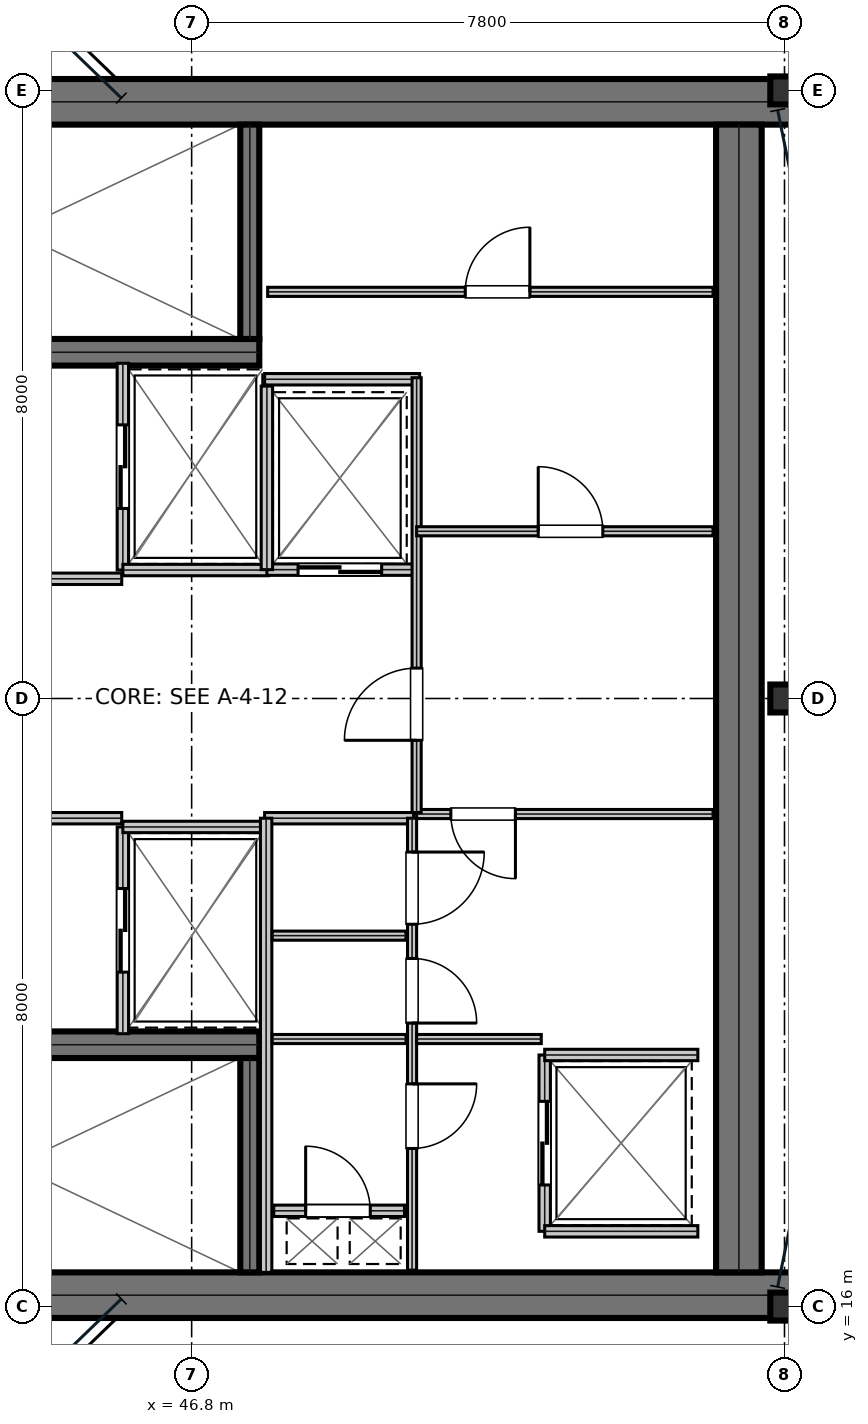
"""IFC4 building model, lengths in metres.
Left out: names, types, materials, properties, quantities, classifications, styles, units other than length and angle.
Written with IfcOpenShell. Run it as: python <this file> out.ifc"""

import sys

from ifc_helpers import new_model, si_unit, direction, frame, frame_2d, origin, origin_2d, place, context, subcontext, project, spatial, rectangle, i_section, extrude, element, fill, save


model = new_model("IFC4")
c1 = context("Model", 3, precision=1e-05, world=origin(), true_north=direction((0.0, 1.0)))
c2 = subcontext(c1, "Body", "Model", "MODEL_VIEW")
j1 = project(units=[si_unit("LENGTHUNIT", "METRE"), si_unit("PLANEANGLEUNIT", "RADIAN")], contexts=[c1])
p1 = place(None, origin())
s1 = spatial("IfcSite", under=j1, at=p1, CompositionType="ELEMENT")
p2 = place(p1, origin())
s2 = spatial("IfcBuilding", under=s1, at=p2, CompositionType="ELEMENT")
p3 = place(p2, frame((0.0, 0.0, 315.45)))
s3 = spatial("IfcBuildingStorey", under=s2, at=p3, CompositionType="ELEMENT", Elevation=315.45)
for number, where, z_axis, x_axis in (
    (1, (38.8, 31.85, 0.0), (0.0, 0.0, 1.0), (1.0, 0.0, 0.0)),
    (2, (38.8, 16.15, 0.0), (0.0, 0.0, 1.0), (1.0, 0.0, 0.0)),
):
    element("IfcWall", number, at=place(p3, frame(where, z_axis=z_axis, x_axis=x_axis)), inside=s3, PredefinedType="SHEAR", context=c2, shape_type="SweptSolid", body=[
        extrude(rectangle(XDim=16.0, YDim=0.6, at=frame_2d((8.0, 0.0))), origin(), (0.0, 0.0, 1.0), 3.78),
    ])
p4 = place(p3, frame((54.0, 16.45, 0.0), z_axis=(0.0, 0.0, 1.0), x_axis=(0.0, 1.0, 0.0)))
e3 = element("IfcWall", 3, at=p4, inside=s3, PredefinedType="SHEAR", context=c2, shape_type="SweptSolid", body=[
    extrude(rectangle(XDim=15.1, YDim=0.6, at=frame_2d((7.55, 0.0))), origin(), (0.0, 0.0, 1.0), 3.78),
])
p5 = place(p3, frame((39.98, 28.555, 0.0), z_axis=(0.0, 0.0, 1.0), x_axis=(1.0, 0.0, 0.0)))
e4 = element("IfcWall", 4, at=p5, inside=s3, PredefinedType="SHEAR", context=c2, shape_type="SweptSolid", body=[
    extrude(rectangle(XDim=7.71, YDim=0.35, at=frame_2d((3.855, 0.0))), origin(), (0.0, 0.0, 1.0), 3.78),
])
p6 = place(p5, frame((0.25, 0.0, 0.0)))
e5 = element("IfcOpeningElement", 5, at=p6, cuts=e4, PredefinedType="OPENING", context=c2, shape_type="SweptSolid", body=[
    extrude(rectangle(XDim=1.1, YDim=2.15, at=frame_2d((0.55, 1.075))), frame((0.0, 0.185, 0.0), z_axis=(0.0, -1.0, 0.0), x_axis=(1.0, 0.0, 0.0)), (0.0, 0.0, 1.0), 0.37),
])
p7 = place(p3, frame((39.98, 19.445, 0.0), z_axis=(0.0, 0.0, 1.0), x_axis=(1.0, 0.0, 0.0)))
e6 = element("IfcWall", 6, at=p7, inside=s3, PredefinedType="SHEAR", context=c2, shape_type="SweptSolid", body=[
    extrude(rectangle(XDim=7.71, YDim=0.35, at=frame_2d((3.855, 0.0))), origin(), (0.0, 0.0, 1.0), 3.78),
])
p8 = place(p7, frame((0.25, 0.0, 0.0)))
e7 = element("IfcOpeningElement", 7, at=p8, cuts=e6, PredefinedType="OPENING", context=c2, shape_type="SweptSolid", body=[
    extrude(rectangle(XDim=1.1, YDim=2.15, at=frame_2d((0.55, 1.075))), frame((0.0, 0.185, 0.0), z_axis=(0.0, -1.0, 0.0), x_axis=(1.0, 0.0, 0.0)), (0.0, 0.0, 1.0), 0.37),
])
for number, where, z_axis, x_axis in (
    (8, (47.565, 28.73, 0.0), (0.0, 0.0, 1.0), (0.0, 1.0, 0.0)),
    (9, (47.565, 16.45, 0.0), (0.0, 0.0, 1.0), (0.0, 1.0, 0.0)),
):
    element("IfcWall", number, at=place(p3, frame(where, z_axis=z_axis, x_axis=x_axis)), inside=s3, PredefinedType="SHEAR", context=c2, shape_type="SweptSolid", body=[
        extrude(rectangle(XDim=2.82, YDim=0.25, at=frame_2d((1.41, 0.0))), origin(), (0.0, 0.0, 1.0), 3.78),
    ])
for number, where, z_axis, x_axis in (
    (10, (54.6, 16.0, 0.0), (0.0, 0.0, 1.0), (1.0, 0.0, 0.0)),
    (11, (54.6, 24.0, 0.0), (0.0, 0.0, 1.0), (1.0, 0.0, 0.0)),
    (12, (54.6, 32.0, 0.0), (0.0, 0.0, 1.0), (1.0, 0.0, 0.0)),
):
    element("IfcColumn", number, at=place(p3, frame(where, z_axis=z_axis, x_axis=x_axis)), inside=s3, PredefinedType="COLUMN", context=c2, shape_type="SweptSolid", body=[
        extrude(i_section(OverallWidth=0.373, OverallDepth=0.368, WebThickness=0.015, FlangeThickness=0.024, at=origin_2d()), origin(), (0.0, 0.0, 1.0), 4.044),
    ])
p9 = place(p3, frame((39.98, 25.575, 0.0), z_axis=(0.0, 0.0, 1.0), x_axis=(1.0, 0.0, 0.0)))
e13 = element("IfcWall", 13, at=p9, inside=s3, PredefinedType="PARTITIONING", context=c2, shape_type="SweptSolid", body=[
    extrude(rectangle(XDim=5.9, YDim=0.15, at=frame_2d((2.95, 0.0))), origin(), (0.0, 0.0, 1.0), 3.78),
])
p10 = place(p9, frame((2.35, 0.0, 0.0)))
e14 = element("IfcOpeningElement", 14, at=p10, cuts=e13, PredefinedType="OPENING", context=c2, shape_type="SweptSolid", body=[
    extrude(rectangle(XDim=1.05, YDim=2.15, at=frame_2d((0.525, 1.075))), frame((0.0, 0.085, 0.0), z_axis=(0.0, -1.0, 0.0), x_axis=(1.0, 0.0, 0.0)), (0.0, 0.0, 1.0), 0.17),
])
p11 = place(p3, frame((39.98, 22.425, 0.0), z_axis=(0.0, 0.0, 1.0), x_axis=(1.0, 0.0, 0.0)))
e15 = element("IfcWall", 15, at=p11, inside=s3, PredefinedType="PARTITIONING", context=c2, shape_type="SweptSolid", body=[
    extrude(rectangle(XDim=5.9, YDim=0.15, at=frame_2d((2.95, 0.0))), origin(), (0.0, 0.0, 1.0), 3.78),
])
p12 = place(p11, frame((2.35, 0.0, 0.0)))
e16 = element("IfcOpeningElement", 16, at=p12, cuts=e15, PredefinedType="OPENING", context=c2, shape_type="SweptSolid", body=[
    extrude(rectangle(XDim=1.05, YDim=2.15, at=frame_2d((0.525, 1.075))), frame((0.0, 0.085, 0.0), z_axis=(0.0, -1.0, 0.0), x_axis=(1.0, 0.0, 0.0)), (0.0, 0.0, 1.0), 0.17),
])
p13 = place(p3, frame((45.895, 25.69, 0.0), z_axis=(0.0, 0.0, 1.0), x_axis=(0.0, 1.0, 0.0)))
e17 = element("IfcWall", 17, at=p13, inside=s3, PredefinedType="PARTITIONING", context=c2, shape_type="SweptSolid", body=[
    extrude(rectangle(XDim=2.72, YDim=0.15, at=frame_2d((1.36, 0.0))), origin(), (0.0, 0.0, 1.0), 3.78),
])
p14 = place(p13, frame((0.81, 0.0, 0.0)))
e18 = element("IfcOpeningElement", 18, at=p14, cuts=e17, PredefinedType="OPENING", context=c2, shape_type="SweptSolid", body=[
    extrude(rectangle(XDim=1.1, YDim=2.15, at=frame_2d((0.55, 1.075))), frame((0.0, 0.085, 0.0), z_axis=(0.0, -1.0, 0.0), x_axis=(1.0, 0.0, 0.0)), (0.0, 0.0, 1.0), 0.17),
])
p15 = place(p3, frame((45.895, 25.69, 0.0), z_axis=(0.0, 0.0, 1.0), x_axis=(1.0, 0.0, 0.0)))
e19 = element("IfcWall", 19, at=p15, inside=s3, PredefinedType="PARTITIONING", context=c2, shape_type="SweptSolid", body=[
    extrude(rectangle(XDim=1.915, YDim=0.15, at=frame_2d((0.958, 0.0))), origin(), (0.0, 0.0, 1.0), 3.78),
])
p16 = place(p3, frame((45.895, 19.59, 0.0), z_axis=(0.0, 0.0, 1.0), x_axis=(0.0, 1.0, 0.0)))
e20 = element("IfcWall", 20, at=p16, inside=s3, PredefinedType="PARTITIONING", context=c2, shape_type="SweptSolid", body=[
    extrude(rectangle(XDim=2.72, YDim=0.15, at=frame_2d((1.36, 0.0))), origin(), (0.0, 0.0, 1.0), 3.78),
])
p17 = place(p16, frame((0.81, 0.0, 0.0)))
e21 = element("IfcOpeningElement", 21, at=p17, cuts=e20, PredefinedType="OPENING", context=c2, shape_type="SweptSolid", body=[
    extrude(rectangle(XDim=1.1, YDim=2.15, at=frame_2d((0.55, 1.075))), frame((0.0, 0.085, 0.0), z_axis=(0.0, -1.0, 0.0), x_axis=(1.0, 0.0, 0.0)), (0.0, 0.0, 1.0), 0.17),
])
p18 = place(p3, frame((45.895, 22.31, 0.0), z_axis=(0.0, 0.0, 1.0), x_axis=(1.0, 0.0, 0.0)))
e22 = element("IfcWall", 22, at=p18, inside=s3, PredefinedType="PARTITIONING", context=c2, shape_type="SweptSolid", body=[
    extrude(rectangle(XDim=1.915, YDim=0.15, at=frame_2d((0.958, 0.0))), origin(), (0.0, 0.0, 1.0), 3.78),
])
p19 = place(p3, frame((47.79, 25.695, 0.0), z_axis=(0.0, 0.0, 1.0), x_axis=(1.0, 0.0, 0.0)))
e23 = element("IfcWall", 23, at=p19, inside=s3, PredefinedType="PARTITIONING", context=c2, shape_type="SweptSolid", body=[
    extrude(rectangle(XDim=1.92, YDim=0.15, at=frame_2d((0.96, 0.0))), origin(), (0.0, 0.0, 1.0), 3.78),
])
p20 = place(p19, frame((0.41, 0.0, 0.0)))
e24 = element("IfcOpeningElement", 24, at=p20, cuts=e23, PredefinedType="OPENING", context=c2, shape_type="SweptSolid", body=[
    extrude(rectangle(XDim=1.1, YDim=2.15, at=frame_2d((0.55, 1.075))), frame((0.0, 0.085, 0.0), z_axis=(0.0, -1.0, 0.0), x_axis=(1.0, 0.0, 0.0)), (0.0, 0.0, 1.0), 0.17),
])
p21 = place(p3, frame((47.79, 25.695, 0.0), z_axis=(0.0, 0.0, 1.0), x_axis=(0.0, 1.0, 0.0)))
e25 = element("IfcWall", 25, at=p21, inside=s3, PredefinedType="PARTITIONING", context=c2, shape_type="SweptSolid", body=[
    extrude(rectangle(XDim=2.415, YDim=0.15, at=frame_2d((1.208, 0.0))), origin(), (0.0, 0.0, 1.0), 3.78),
])
p22 = place(p3, frame((51.445, 16.99, 0.0), z_axis=(0.0, 0.0, 1.0), x_axis=(0.0, 1.0, 0.0)))
e26 = element("IfcWall", 26, at=p22, inside=s3, PredefinedType="PARTITIONING", context=c2, shape_type="SweptSolid", body=[
    extrude(rectangle(XDim=2.32, YDim=0.15, at=frame_2d((1.16, 0.0))), origin(), (0.0, 0.0, 1.0), 3.78),
])
p23 = place(p22, frame((0.61, 0.0, 0.0)))
e27 = element("IfcOpeningElement", 27, at=p23, cuts=e26, PredefinedType="OPENING", context=c2, shape_type="SweptSolid", body=[
    extrude(rectangle(XDim=1.1, YDim=2.15, at=frame_2d((0.55, 1.075))), frame((0.0, 0.085, 0.0), z_axis=(0.0, -1.0, 0.0), x_axis=(1.0, 0.0, 0.0)), (0.0, 0.0, 1.0), 0.17),
])
for number, where, z_axis, x_axis in (
    (28, (51.445, 16.99, 0.0), (0.0, 0.0, 1.0), (1.0, 0.0, 0.0)),
    (29, (51.445, 19.31, 0.0), (0.0, 0.0, 1.0), (1.0, 0.0, 0.0)),
):
    element("IfcWall", number, at=place(p3, frame(where, z_axis=z_axis, x_axis=x_axis)), inside=s3, PredefinedType="PARTITIONING", context=c2, shape_type="SweptSolid", body=[
        extrude(rectangle(XDim=2.015, YDim=0.15, at=frame_2d((1.007, 0.0))), origin(), (0.0, 0.0, 1.0), 3.78),
    ])
p24 = place(p3, frame((47.88, 17.26, 0.0), z_axis=(0.0, 0.0, 1.0), x_axis=(1.0, 0.0, 0.0)))
e30 = element("IfcWall", 30, at=p24, inside=s3, PredefinedType="PARTITIONING", context=c2, shape_type="SweptSolid", body=[
    extrude(rectangle(XDim=1.72, YDim=0.15, at=frame_2d((0.86, 0.0))), origin(), (0.0, 0.0, 1.0), 3.78),
])
p25 = place(p24, frame((0.42, 0.0, 0.0)))
e31 = element("IfcOpeningElement", 31, at=p25, cuts=e30, PredefinedType="OPENING", context=c2, shape_type="SweptSolid", body=[
    extrude(rectangle(XDim=0.85, YDim=2.15, at=frame_2d((0.425, 1.075))), frame((0.0, 0.085, 0.0), z_axis=(0.0, -1.0, 0.0), x_axis=(1.0, 0.0, 0.0)), (0.0, 0.0, 1.0), 0.17),
])
p26 = place(p3, frame((47.76, 22.425, 0.0), z_axis=(0.0, 0.0, 1.0), x_axis=(1.0, 0.0, 0.0)))
e32 = element("IfcWall", 32, at=p26, inside=s3, PredefinedType="PARTITIONING", context=c2, shape_type="SweptSolid", body=[
    extrude(rectangle(XDim=1.96, YDim=0.15, at=frame_2d((0.98, 0.0))), origin(), (0.0, 0.0, 1.0), 3.78),
])
p27 = place(p3, frame((47.78, 16.45, 0.0), z_axis=(0.0, 0.0, 1.0), x_axis=(0.0, 1.0, 0.0)))
e33 = element("IfcWall", 33, at=p27, inside=s3, PredefinedType="PARTITIONING", context=c2, shape_type="SweptSolid", body=[
    extrude(rectangle(XDim=5.975, YDim=0.15, at=frame_2d((2.988, 0.0))), origin(), (0.0, 0.0, 1.0), 3.78),
])
for number, where, z_axis, x_axis in (
    (34, (47.86, 19.52, 0.0), (0.0, 0.0, 1.0), (1.0, 0.0, 0.0)),
    (35, (47.86, 20.88, 0.0), (0.0, 0.0, 1.0), (1.0, 0.0, 0.0)),
):
    element("IfcWall", number, at=place(p3, frame(where, z_axis=z_axis, x_axis=x_axis)), inside=s3, PredefinedType="PARTITIONING", context=c2, shape_type="SweptSolid", body=[
        extrude(rectangle(XDim=1.76, YDim=0.12, at=frame_2d((0.88, 0.0))), origin(), (0.0, 0.0, 1.0), 3.78),
    ])
p28 = place(p3, frame((49.7, 16.48, 0.0), z_axis=(0.0, 0.0, 1.0), x_axis=(0.0, 1.0, 0.0)))
e36 = element("IfcWall", 36, at=p28, inside=s3, PredefinedType="PARTITIONING", context=c2, shape_type="SweptSolid", body=[
    extrude(rectangle(XDim=5.945, YDim=0.12, at=frame_2d((2.973, 0.0))), origin(), (0.0, 0.0, 1.0), 3.78),
])
p29 = place(p28, frame((1.6, 0.0, 0.0)))
e37 = element("IfcOpeningElement", 37, at=p29, cuts=e36, PredefinedType="OPENING", context=c2, shape_type="SweptSolid", body=[
    extrude(rectangle(XDim=0.85, YDim=2.15, at=frame_2d((0.425, 1.075))), frame((0.0, 0.07, 0.0), z_axis=(0.0, -1.0, 0.0), x_axis=(1.0, 0.0, 0.0)), (0.0, 0.0, 1.0), 0.14),
])
p30 = place(p28, frame((3.25, 0.0, 0.0)))
e38 = element("IfcOpeningElement", 38, at=p30, cuts=e36, PredefinedType="OPENING", context=c2, shape_type="SweptSolid", body=[
    extrude(rectangle(XDim=0.85, YDim=2.15, at=frame_2d((0.425, 1.075))), frame((0.0, 0.07, 0.0), z_axis=(0.0, -1.0, 0.0), x_axis=(1.0, 0.0, 0.0)), (0.0, 0.0, 1.0), 0.14),
])
p31 = place(p28, frame((4.55, 0.0, 0.0)))
e39 = element("IfcOpeningElement", 39, at=p31, cuts=e36, PredefinedType="OPENING", context=c2, shape_type="SweptSolid", body=[
    extrude(rectangle(XDim=0.95, YDim=2.15, at=frame_2d((0.475, 1.075))), frame((0.0, 0.07, 0.0), z_axis=(0.0, -1.0, 0.0), x_axis=(1.0, 0.0, 0.0)), (0.0, 0.0, 1.0), 0.14),
])
p32 = place(p3, frame((49.76, 22.48, 0.0), z_axis=(0.0, 0.0, 1.0), x_axis=(1.0, 0.0, 0.0)))
e40 = element("IfcWall", 40, at=p32, inside=s3, PredefinedType="PARTITIONING", context=c2, shape_type="SweptSolid", body=[
    extrude(rectangle(XDim=3.9, YDim=0.12, at=frame_2d((1.95, 0.0))), origin(), (0.0, 0.0, 1.0), 3.78),
])
p33 = place(p32, frame((0.45, 0.0, 0.0)))
e41 = element("IfcOpeningElement", 41, at=p33, cuts=e40, PredefinedType="OPENING", context=c2, shape_type="SweptSolid", body=[
    extrude(rectangle(XDim=0.85, YDim=2.15, at=frame_2d((0.425, 1.075))), frame((0.0, 0.07, 0.0), z_axis=(0.0, -1.0, 0.0), x_axis=(1.0, 0.0, 0.0)), (0.0, 0.0, 1.0), 0.14),
])
p34 = place(p3, frame((49.76, 19.52, 0.0), z_axis=(0.0, 0.0, 1.0), x_axis=(1.0, 0.0, 0.0)))
e42 = element("IfcWall", 42, at=p34, inside=s3, PredefinedType="PARTITIONING", context=c2, shape_type="SweptSolid", body=[
    extrude(rectangle(XDim=1.64, YDim=0.12, at=frame_2d((0.82, 0.0))), origin(), (0.0, 0.0, 1.0), 3.78),
])
p35 = place(p3, frame((47.76, 28.2, 0.0), z_axis=(0.0, 0.0, 1.0), x_axis=(1.0, 0.0, 0.0)))
e43 = element("IfcWall", 43, at=p35, inside=s3, PredefinedType="PARTITIONING", context=c2, shape_type="SweptSolid", body=[
    extrude(rectangle(XDim=2.04, YDim=0.15, at=frame_2d((1.02, 0.0))), origin(), (0.0, 0.0, 1.0), 3.78),
])
p36 = place(p3, frame((49.76, 22.5, 0.0), z_axis=(0.0, 0.0, 1.0), x_axis=(0.0, 1.0, 0.0)))
e44 = element("IfcWall", 44, at=p36, inside=s3, PredefinedType="PARTITIONING", context=c2, shape_type="SweptSolid", body=[
    extrude(rectangle(XDim=5.72, YDim=0.12, at=frame_2d((2.86, 0.0))), origin(), (0.0, 0.0, 1.0), 3.78),
])
p37 = place(p36, frame((0.95, 0.0, 0.0)))
e45 = element("IfcOpeningElement", 45, at=p37, cuts=e44, PredefinedType="OPENING", context=c2, shape_type="SweptSolid", body=[
    extrude(rectangle(XDim=0.95, YDim=2.15, at=frame_2d((0.475, 1.075))), frame((0.0, 0.07, 0.0), z_axis=(0.0, -1.0, 0.0), x_axis=(1.0, 0.0, 0.0)), (0.0, 0.0, 1.0), 0.14),
])
p38 = place(p3, frame((49.76, 26.2, 0.0), z_axis=(0.0, 0.0, 1.0), x_axis=(1.0, 0.0, 0.0)))
e46 = element("IfcWall", 46, at=p38, inside=s3, PredefinedType="PARTITIONING", context=c2, shape_type="SweptSolid", body=[
    extrude(rectangle(XDim=3.9, YDim=0.12, at=frame_2d((1.95, 0.0))), origin(), (0.0, 0.0, 1.0), 3.78),
])
p39 = place(p38, frame((1.6, 0.0, 0.0)))
e47 = element("IfcOpeningElement", 47, at=p39, cuts=e46, PredefinedType="OPENING", context=c2, shape_type="SweptSolid", body=[
    extrude(rectangle(XDim=0.85, YDim=2.15, at=frame_2d((0.425, 1.075))), frame((0.0, 0.07, 0.0), z_axis=(0.0, -1.0, 0.0), x_axis=(1.0, 0.0, 0.0)), (0.0, 0.0, 1.0), 0.14),
])
p40 = place(p3, frame((47.8, 29.35, 0.0), z_axis=(0.0, 0.0, 1.0), x_axis=(1.0, 0.0, 0.0)))
e48 = element("IfcWall", 48, at=p40, inside=s3, PredefinedType="PARTITIONING", context=c2, shape_type="SweptSolid", body=[
    extrude(rectangle(XDim=5.86, YDim=0.12, at=frame_2d((2.93, 0.0))), origin(), (0.0, 0.0, 1.0), 3.78),
])
p41 = place(p40, frame((2.6, 0.0, 0.0)))
e49 = element("IfcOpeningElement", 49, at=p41, cuts=e48, PredefinedType="OPENING", context=c2, shape_type="SweptSolid", body=[
    extrude(rectangle(XDim=0.85, YDim=2.15, at=frame_2d((0.425, 1.075))), frame((0.0, 0.07, 0.0), z_axis=(0.0, -1.0, 0.0), x_axis=(1.0, 0.0, 0.0)), (0.0, 0.0, 1.0), 0.14),
])
p42 = place(p14, frame((1.1, 0.0, 0.0), z_axis=(0.0, 0.0, 1.0), x_axis=(-1.0, 0.0, 0.0)))
e50 = element("IfcDoor", 50, at=p42, inside=s3, OperationType="DOUBLE_DOOR_SLIDING", PredefinedType="DOOR", context=c2, shape_type="SweptSolid", body=[
    extrude(rectangle(XDim=1.1, YDim=2.15, at=frame_2d((0.55, 1.075))), frame((0.0, 0.025, 0.0), z_axis=(0.0, -1.0, 0.0), x_axis=(1.0, 0.0, 0.0)), (0.0, 0.0, 1.0), 0.05),
])
fill(e18, e50)
p43 = place(p17, frame((1.1, 0.0, 0.0), z_axis=(0.0, 0.0, 1.0), x_axis=(-1.0, 0.0, 0.0)))
e51 = element("IfcDoor", 51, at=p43, inside=s3, OperationType="DOUBLE_DOOR_SLIDING", PredefinedType="DOOR", context=c2, shape_type="SweptSolid", body=[
    extrude(rectangle(XDim=1.1, YDim=2.15, at=frame_2d((0.55, 1.075))), frame((0.0, 0.025, 0.0), z_axis=(0.0, -1.0, 0.0), x_axis=(1.0, 0.0, 0.0)), (0.0, 0.0, 1.0), 0.05),
])
fill(e21, e51)
p44 = place(p20, frame((1.1, 0.0, 0.0), z_axis=(0.0, 0.0, 1.0), x_axis=(-1.0, 0.0, 0.0)))
e52 = element("IfcDoor", 52, at=p44, inside=s3, OperationType="DOUBLE_DOOR_SLIDING", PredefinedType="DOOR", context=c2, shape_type="SweptSolid", body=[
    extrude(rectangle(XDim=1.1, YDim=2.15, at=frame_2d((0.55, 1.075))), frame((0.0, 0.025, 0.0), z_axis=(0.0, -1.0, 0.0), x_axis=(1.0, 0.0, 0.0)), (0.0, 0.0, 1.0), 0.05),
])
fill(e24, e52)
p45 = place(p23, frame((1.1, 0.0, 0.0), z_axis=(0.0, 0.0, 1.0), x_axis=(-1.0, 0.0, 0.0)))
e53 = element("IfcDoor", 53, at=p45, inside=s3, OperationType="DOUBLE_DOOR_SLIDING", PredefinedType="DOOR", context=c2, shape_type="SweptSolid", body=[
    extrude(rectangle(XDim=1.1, YDim=2.15, at=frame_2d((0.55, 1.075))), frame((0.0, 0.025, 0.0), z_axis=(0.0, -1.0, 0.0), x_axis=(1.0, 0.0, 0.0)), (0.0, 0.0, 1.0), 0.05),
])
fill(e27, e53)
p46 = place(p25, origin())
e54 = element("IfcDoor", 54, at=p46, inside=s3, OperationType="SINGLE_SWING_LEFT", PredefinedType="TRAPDOOR", context=c2, shape_type="SweptSolid", body=[
    extrude(rectangle(XDim=0.85, YDim=2.15, at=frame_2d((0.425, 1.075))), frame((0.0, 0.025, 0.0), z_axis=(0.0, -1.0, 0.0), x_axis=(1.0, 0.0, 0.0)), (0.0, 0.0, 1.0), 0.05),
])
fill(e31, e54)
p47 = place(p29, frame((0.85, 0.0, 0.0), z_axis=(0.0, 0.0, 1.0), x_axis=(-1.0, 0.0, 0.0)))
e55 = element("IfcDoor", 55, at=p47, inside=s3, OperationType="SINGLE_SWING_LEFT", PredefinedType="DOOR", context=c2, shape_type="SweptSolid", body=[
    extrude(rectangle(XDim=0.85, YDim=2.15, at=frame_2d((0.425, 1.075))), frame((0.0, 0.025, 0.0), z_axis=(0.0, -1.0, 0.0), x_axis=(1.0, 0.0, 0.0)), (0.0, 0.0, 1.0), 0.05),
])
fill(e37, e55)
p48 = place(p30, frame((0.85, 0.0, 0.0), z_axis=(0.0, 0.0, 1.0), x_axis=(-1.0, 0.0, 0.0)))
e56 = element("IfcDoor", 56, at=p48, inside=s3, OperationType="SINGLE_SWING_RIGHT", PredefinedType="DOOR", context=c2, shape_type="SweptSolid", body=[
    extrude(rectangle(XDim=0.85, YDim=2.15, at=frame_2d((0.425, 1.075))), frame((0.0, 0.025, 0.0), z_axis=(0.0, -1.0, 0.0), x_axis=(1.0, 0.0, 0.0)), (0.0, 0.0, 1.0), 0.05),
])
fill(e38, e56)
p49 = place(p31, frame((0.95, 0.0, 0.0), z_axis=(0.0, 0.0, 1.0), x_axis=(-1.0, 0.0, 0.0)))
e57 = element("IfcDoor", 57, at=p49, inside=s3, OperationType="SINGLE_SWING_LEFT", PredefinedType="DOOR", context=c2, shape_type="SweptSolid", body=[
    extrude(rectangle(XDim=0.95, YDim=2.15, at=frame_2d((0.475, 1.075))), frame((0.0, 0.025, 0.0), z_axis=(0.0, -1.0, 0.0), x_axis=(1.0, 0.0, 0.0)), (0.0, 0.0, 1.0), 0.05),
])
fill(e39, e57)
p50 = place(p33, frame((0.85, 0.0, 0.0), z_axis=(0.0, 0.0, 1.0), x_axis=(-1.0, 0.0, 0.0)))
e58 = element("IfcDoor", 58, at=p50, inside=s3, OperationType="SINGLE_SWING_LEFT", PredefinedType="DOOR", context=c2, shape_type="SweptSolid", body=[
    extrude(rectangle(XDim=0.85, YDim=2.15, at=frame_2d((0.425, 1.075))), frame((0.0, 0.025, 0.0), z_axis=(0.0, -1.0, 0.0), x_axis=(1.0, 0.0, 0.0)), (0.0, 0.0, 1.0), 0.05),
])
fill(e41, e58)
p51 = place(p37, origin())
e59 = element("IfcDoor", 59, at=p51, inside=s3, OperationType="SINGLE_SWING_LEFT", PredefinedType="DOOR", context=c2, shape_type="SweptSolid", body=[
    extrude(rectangle(XDim=0.95, YDim=2.15, at=frame_2d((0.475, 1.075))), frame((0.0, 0.025, 0.0), z_axis=(0.0, -1.0, 0.0), x_axis=(1.0, 0.0, 0.0)), (0.0, 0.0, 1.0), 0.05),
])
fill(e45, e59)
p52 = place(p39, origin())
e60 = element("IfcDoor", 60, at=p52, inside=s3, OperationType="SINGLE_SWING_LEFT", PredefinedType="DOOR", context=c2, shape_type="SweptSolid", body=[
    extrude(rectangle(XDim=0.85, YDim=2.15, at=frame_2d((0.425, 1.075))), frame((0.0, 0.025, 0.0), z_axis=(0.0, -1.0, 0.0), x_axis=(1.0, 0.0, 0.0)), (0.0, 0.0, 1.0), 0.05),
])
fill(e47, e60)
p53 = place(p41, origin())
e61 = element("IfcDoor", 61, at=p53, inside=s3, OperationType="SINGLE_SWING_RIGHT", PredefinedType="DOOR", context=c2, shape_type="SweptSolid", body=[
    extrude(rectangle(XDim=0.85, YDim=2.15, at=frame_2d((0.425, 1.075))), frame((0.0, 0.025, 0.0), z_axis=(0.0, -1.0, 0.0), x_axis=(1.0, 0.0, 0.0)), (0.0, 0.0, 1.0), 0.05),
])
fill(e49, e61)
save(model, sys.argv[1])
